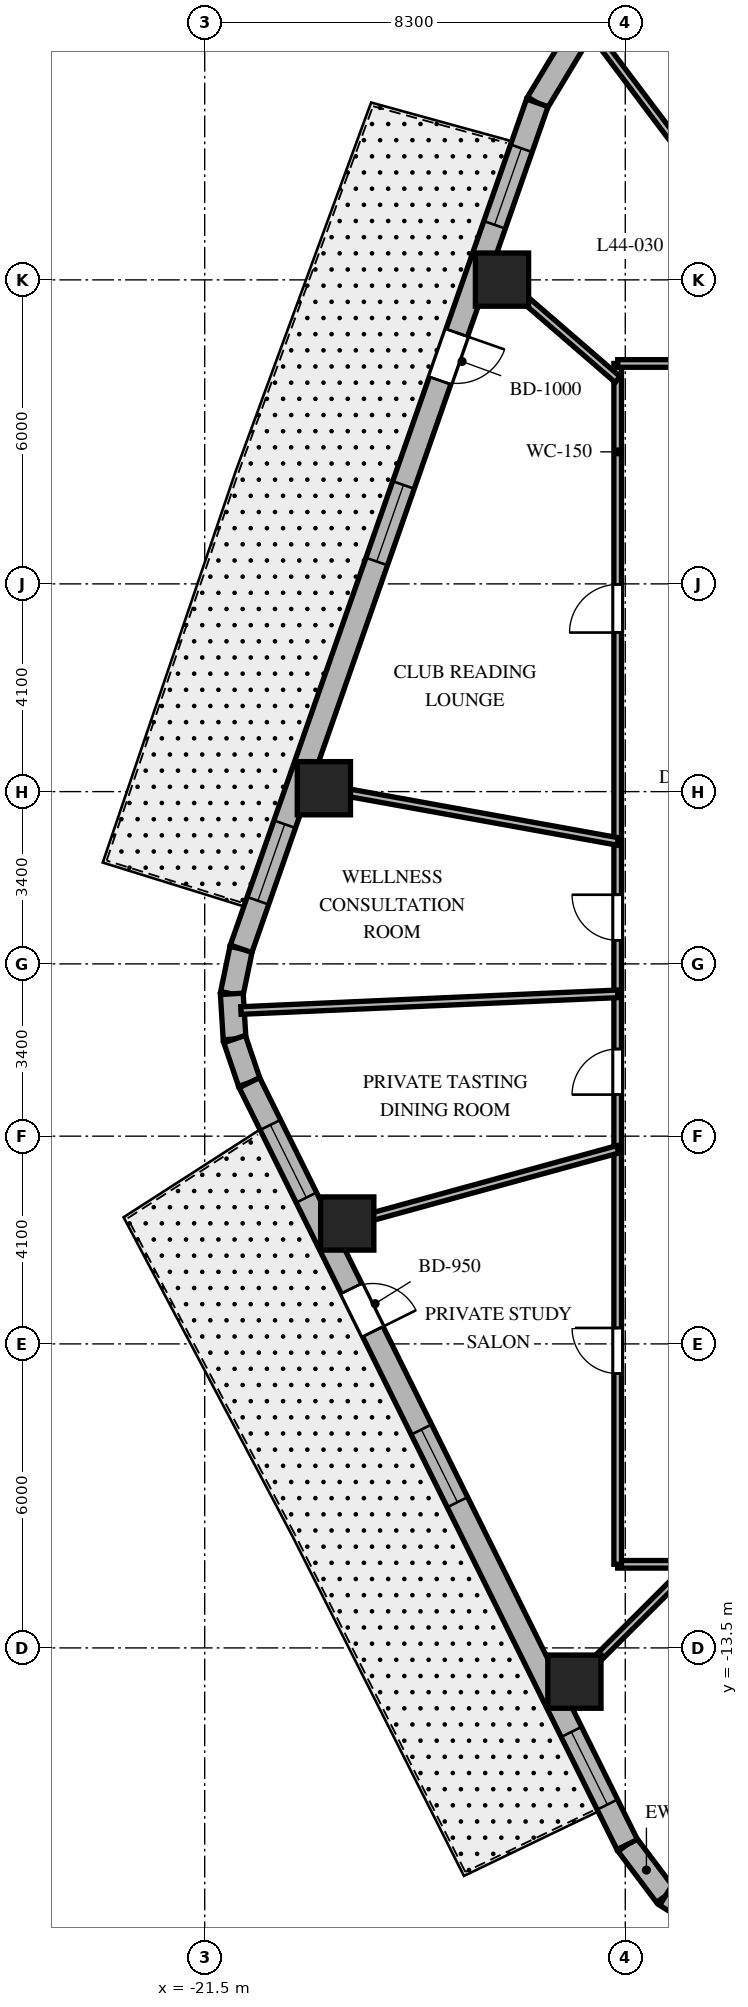
"""IFC4 building model, lengths in metres.
Left out: names, types, materials, properties, quantities, classifications, styles, units other than length and angle.
Written with IfcOpenShell. Run it as: python <this file> out.ifc"""

import sys

from ifc_helpers import new_model, si_unit, direction, frame, frame_2d, origin, origin_2d, place, context, subcontext, project, spatial, rectangle, extrude, element, fill, save


model = new_model("IFC4")
c1 = context("Model", 3, precision=1e-05, world=origin(), true_north=direction((0.0, 1.0)))
c2 = subcontext(c1, "Body", "Model", "MODEL_VIEW")
j1 = project(units=[si_unit("LENGTHUNIT", "METRE"), si_unit("PLANEANGLEUNIT", "RADIAN")], contexts=[c1])
p1 = place(None, origin())
s1 = spatial("IfcSite", under=j1, at=p1, CompositionType="ELEMENT")
p2 = place(p1, origin())
s2 = spatial("IfcBuilding", under=s1, at=p2, CompositionType="ELEMENT")
p3 = place(p2, frame((0.0, 0.0, 179.3)))
s3 = spatial("IfcBuildingStorey", under=s2, at=p3, CompositionType="ELEMENT", Elevation=179.3)
for number, where, z_axis, x_axis in (
    (1, (-15.633, 13.505, 0.0), (0.0, 0.0, 1.0), (1.0, 0.0, 0.0)),
    (2, (-19.148, 3.467, 0.0), (0.0, 0.0, 1.0), (1.0, 0.0, 0.0)),
    (3, (-18.687, -5.124, 0.0), (0.0, 0.0, 1.0), (1.0, 0.0, 0.0)),
    (4, (-14.204, -14.166, 0.0), (0.0, 0.0, 1.0), (1.0, 0.0, 0.0)),
):
    element("IfcColumn", number, at=place(p3, frame(where, z_axis=z_axis, x_axis=x_axis)), inside=s3, PredefinedType="COLUMN", context=c2, shape_type="SweptSolid", body=[
        extrude(rectangle(XDim=1.05, YDim=1.05, at=origin_2d()), origin(), (0.0, 0.0, 1.0), 3.7),
    ])
p4 = place(p3, frame((-13.162, -17.381, 0.0), z_axis=(0.0, 0.0, 1.0), x_axis=(0.601515770517, -0.798860925205, 0.0)))
e5 = element("IfcWall", 5, at=p4, inside=s3, PredefinedType="SOLIDWALL", context=c2, shape_type="SweptSolid", body=[
    extrude(rectangle(XDim=1.262, YDim=0.45, at=frame_2d((0.631, 0.0))), origin(), (0.0, 0.0, 1.0), 3.4),
])
p5 = place(p3, frame((-12.403, -18.389, 0.0), z_axis=(0.0, 0.0, 1.0), x_axis=(0.849795170926, -0.527113049991, 0.0)))
e6 = element("IfcWall", 6, at=p5, inside=s3, PredefinedType="SOLIDWALL", context=c2, shape_type="SweptSolid", body=[
    extrude(rectangle(XDim=1.241, YDim=0.45, at=frame_2d((0.62, 0.0))), origin(), (0.0, 0.0, 1.0), 3.4),
])
p6 = place(p3, frame((-14.214, 18.192, 0.0), z_axis=(0.0, 0.0, 1.0), x_axis=(-0.516340945502, -0.856383108193, 0.0)))
e7 = element("IfcWall", 7, at=p6, inside=s3, PredefinedType="SOLIDWALL", context=c2, shape_type="SweptSolid", body=[
    extrude(rectangle(XDim=1.4, YDim=0.45, at=frame_2d((0.7, 0.0))), origin(), (0.0, 0.0, 1.0), 3.4),
])
p7 = place(p3, frame((-20.782, 0.298, 0.0), z_axis=(0.0, 0.0, 1.0), x_axis=(-0.202570068411, -0.979267771033, 0.0)))
e8 = element("IfcWall", 8, at=p7, inside=s3, PredefinedType="SOLIDWALL", context=c2, shape_type="SweptSolid", body=[
    extrude(rectangle(XDim=0.909, YDim=0.45, at=frame_2d((0.454, 0.0))), origin(), (0.0, 0.0, 1.0), 3.4),
])
p8 = place(p3, frame((-20.966, -0.592, 0.0), z_axis=(0.0, 0.0, 1.0), x_axis=(0.061748898935, -0.998091715966, 0.0)))
e9 = element("IfcWall", 9, at=p8, inside=s3, PredefinedType="SOLIDWALL", context=c2, shape_type="SweptSolid", body=[
    extrude(rectangle(XDim=0.894, YDim=0.45, at=frame_2d((0.447, 0.0))), origin(), (0.0, 0.0, 1.0), 3.4),
])
p9 = place(p3, frame((-20.911, -1.484, 0.0), z_axis=(0.0, 0.0, 1.0), x_axis=(0.321623334353, -0.946867694453, 0.0)))
e10 = element("IfcWall", 10, at=p9, inside=s3, PredefinedType="SOLIDWALL", context=c2, shape_type="SweptSolid", body=[
    extrude(rectangle(XDim=0.909, YDim=0.45, at=frame_2d((0.454, 0.0))), origin(), (0.0, 0.0, 1.0), 3.4),
])
p10 = place(p3, frame((-14.937, 16.993, 0.0), z_axis=(0.0, 0.0, 1.0), x_axis=(-0.330431575061, -0.943829949834, 0.0)))
e11 = element("IfcWall", 11, at=p10, inside=s3, PredefinedType="SOLIDWALL", context=c2, shape_type="SweptSolid", body=[
    extrude(rectangle(XDim=17.689, YDim=0.45, at=frame_2d((8.844, 0.0))), origin(), (0.0, 0.0, 1.0), 3.4),
])
p11 = place(p10, frame((4.807, 0.0, 0.0)))
e12 = element("IfcOpeningElement", 12, at=p11, cuts=e11, PredefinedType="OPENING", context=c2, shape_type="SweptSolid", body=[
    extrude(rectangle(XDim=1.0, YDim=2.15, at=frame_2d((0.5, 1.075))), frame((0.0, 0.235, 0.0), z_axis=(0.0, -1.0, 0.0), x_axis=(1.0, 0.0, 0.0)), (0.0, 0.0, 1.0), 0.47),
])
p12 = place(p10, frame((0.95, 0.0, 0.8)))
e13 = element("IfcOpeningElement", 13, at=p12, cuts=e11, PredefinedType="OPENING", context=c2, shape_type="SweptSolid", body=[
    extrude(rectangle(XDim=1.6, YDim=1.75, at=frame_2d((0.8, 0.875))), frame((0.0, 0.235, 0.0), z_axis=(0.0, -1.0, 0.0), x_axis=(1.0, 0.0, 0.0)), (0.0, 0.0, 1.0), 0.47),
])
p13 = place(p10, frame((7.99, 0.0, 0.8)))
e14 = element("IfcOpeningElement", 14, at=p13, cuts=e11, PredefinedType="OPENING", context=c2, shape_type="SweptSolid", body=[
    extrude(rectangle(XDim=1.6, YDim=1.75, at=frame_2d((0.8, 0.875))), frame((0.0, 0.235, 0.0), z_axis=(0.0, -1.0, 0.0), x_axis=(1.0, 0.0, 0.0)), (0.0, 0.0, 1.0), 0.47),
])
p14 = place(p10, frame((15.084, 0.0, 0.8)))
e15 = element("IfcOpeningElement", 15, at=p14, cuts=e11, PredefinedType="OPENING", context=c2, shape_type="SweptSolid", body=[
    extrude(rectangle(XDim=1.6, YDim=1.75, at=frame_2d((0.8, 0.875))), frame((0.0, 0.235, 0.0), z_axis=(0.0, -1.0, 0.0), x_axis=(1.0, 0.0, 0.0)), (0.0, 0.0, 1.0), 0.47),
])
p15 = place(p3, frame((-20.618, -2.344, 0.0), z_axis=(0.0, 0.0, 1.0), x_axis=(0.444243691097, -0.895905990002, 0.0)))
e16 = element("IfcWall", 16, at=p15, inside=s3, PredefinedType="SOLIDWALL", context=c2, shape_type="SweptSolid", body=[
    extrude(rectangle(XDim=16.784, YDim=0.45, at=frame_2d((8.392, 0.0))), origin(), (0.0, 0.0, 1.0), 3.4),
])
p16 = place(p15, frame((4.535, 0.0, 0.0)))
e17 = element("IfcOpeningElement", 17, at=p16, cuts=e16, PredefinedType="OPENING", context=c2, shape_type="SweptSolid", body=[
    extrude(rectangle(XDim=0.95, YDim=2.15, at=frame_2d((0.475, 1.075))), frame((0.0, 0.235, 0.0), z_axis=(0.0, -1.0, 0.0), x_axis=(1.0, 0.0, 0.0)), (0.0, 0.0, 1.0), 0.47),
])
p17 = place(p15, frame((0.931, 0.0, 0.8)))
e18 = element("IfcOpeningElement", 18, at=p17, cuts=e16, PredefinedType="OPENING", context=c2, shape_type="SweptSolid", body=[
    extrude(rectangle(XDim=1.6, YDim=1.75, at=frame_2d((0.8, 0.875))), frame((0.0, 0.235, 0.0), z_axis=(0.0, -1.0, 0.0), x_axis=(1.0, 0.0, 0.0)), (0.0, 0.0, 1.0), 0.47),
])
p18 = place(p15, frame((7.642, 0.0, 0.8)))
e19 = element("IfcOpeningElement", 19, at=p18, cuts=e16, PredefinedType="OPENING", context=c2, shape_type="SweptSolid", body=[
    extrude(rectangle(XDim=1.6, YDim=1.75, at=frame_2d((0.8, 0.875))), frame((0.0, 0.235, 0.0), z_axis=(0.0, -1.0, 0.0), x_axis=(1.0, 0.0, 0.0)), (0.0, 0.0, 1.0), 0.47),
])
p19 = place(p15, frame((14.303, 0.0, 0.8)))
e20 = element("IfcOpeningElement", 20, at=p19, cuts=e16, PredefinedType="OPENING", context=c2, shape_type="SweptSolid", body=[
    extrude(rectangle(XDim=1.6, YDim=1.75, at=frame_2d((0.8, 0.875))), frame((0.0, 0.235, 0.0), z_axis=(0.0, -1.0, 0.0), x_axis=(1.0, 0.0, 0.0)), (0.0, 0.0, 1.0), 0.47),
])
p20 = place(p3, frame((13.35, -11.85, 0.0), z_axis=(0.0, 0.0, 1.0), x_axis=(-1.0, 0.0, 0.0)))
e21 = element("IfcWall", 21, at=p20, inside=s3, PredefinedType="PARTITIONING", context=c2, shape_type="SweptSolid", body=[
    extrude(rectangle(XDim=26.7, YDim=0.15, at=frame_2d((13.35, 0.0))), origin(), (0.0, 0.0, 1.0), 2.84),
])
p21 = place(p20, frame((22.7, 0.0, 0.0)))
e22 = element("IfcOpeningElement", 22, at=p21, cuts=e21, PredefinedType="OPENING", context=c2, shape_type="SweptSolid", body=[
    extrude(rectangle(XDim=0.9, YDim=2.03, at=frame_2d((0.45, 1.015))), frame((0.0, 0.085, 0.0), z_axis=(0.0, -1.0, 0.0), x_axis=(1.0, 0.0, 0.0)), (0.0, 0.0, 1.0), 0.17),
])
p22 = place(p20, frame((18.523, 0.0, 0.0)))
e23 = element("IfcOpeningElement", 23, at=p22, cuts=e21, PredefinedType="OPENING", context=c2, shape_type="SweptSolid", body=[
    extrude(rectangle(XDim=0.95, YDim=2.03, at=frame_2d((0.475, 1.015))), frame((0.0, 0.085, 0.0), z_axis=(0.0, -1.0, 0.0), x_axis=(1.0, 0.0, 0.0)), (0.0, 0.0, 1.0), 0.17),
])
p23 = place(p20, frame((14.469, 0.0, 0.0)))
e24 = element("IfcOpeningElement", 24, at=p23, cuts=e21, PredefinedType="OPENING", context=c2, shape_type="SweptSolid", body=[
    extrude(rectangle(XDim=0.95, YDim=2.03, at=frame_2d((0.475, 1.015))), frame((0.0, 0.085, 0.0), z_axis=(0.0, -1.0, 0.0), x_axis=(1.0, 0.0, 0.0)), (0.0, 0.0, 1.0), 0.17),
])
p24 = place(p20, frame((10.314, 0.0, 0.0)))
e25 = element("IfcOpeningElement", 25, at=p24, cuts=e21, PredefinedType="OPENING", context=c2, shape_type="SweptSolid", body=[
    extrude(rectangle(XDim=0.95, YDim=2.03, at=frame_2d((0.475, 1.015))), frame((0.0, 0.085, 0.0), z_axis=(0.0, -1.0, 0.0), x_axis=(1.0, 0.0, 0.0)), (0.0, 0.0, 1.0), 0.17),
])
p25 = place(p20, frame((3.995, 0.0, 0.0)))
e26 = element("IfcOpeningElement", 26, at=p25, cuts=e21, PredefinedType="OPENING", context=c2, shape_type="SweptSolid", body=[
    extrude(rectangle(XDim=0.95, YDim=2.03, at=frame_2d((0.475, 1.015))), frame((0.0, 0.085, 0.0), z_axis=(0.0, -1.0, 0.0), x_axis=(1.0, 0.0, 0.0)), (0.0, 0.0, 1.0), 0.17),
])
p26 = place(p3, frame((-13.35, -11.85, 0.0), z_axis=(0.0, 0.0, 1.0), x_axis=(0.0, 1.0, 0.0)))
e27 = element("IfcWall", 27, at=p26, inside=s3, PredefinedType="PARTITIONING", context=c2, shape_type="SweptSolid", body=[
    extrude(rectangle(XDim=23.7, YDim=0.15, at=frame_2d((11.85, 0.0))), origin(), (0.0, 0.0, 1.0), 2.84),
])
p27 = place(p26, frame((18.389, 0.0, 0.0)))
e28 = element("IfcOpeningElement", 28, at=p27, cuts=e27, PredefinedType="OPENING", context=c2, shape_type="SweptSolid", body=[
    extrude(rectangle(XDim=0.95, YDim=2.03, at=frame_2d((0.475, 1.015))), frame((0.0, 0.085, 0.0), z_axis=(0.0, -1.0, 0.0), x_axis=(1.0, 0.0, 0.0)), (0.0, 0.0, 1.0), 0.17),
])
p28 = place(p26, frame((12.315, 0.0, 0.0)))
e29 = element("IfcOpeningElement", 29, at=p28, cuts=e27, PredefinedType="OPENING", context=c2, shape_type="SweptSolid", body=[
    extrude(rectangle(XDim=0.9, YDim=2.03, at=frame_2d((0.45, 1.015))), frame((0.0, 0.085, 0.0), z_axis=(0.0, -1.0, 0.0), x_axis=(1.0, 0.0, 0.0)), (0.0, 0.0, 1.0), 0.17),
])
p29 = place(p26, frame((9.27, 0.0, 0.0)))
e30 = element("IfcOpeningElement", 30, at=p29, cuts=e27, PredefinedType="OPENING", context=c2, shape_type="SweptSolid", body=[
    extrude(rectangle(XDim=0.9, YDim=2.03, at=frame_2d((0.45, 1.015))), frame((0.0, 0.085, 0.0), z_axis=(0.0, -1.0, 0.0), x_axis=(1.0, 0.0, 0.0)), (0.0, 0.0, 1.0), 0.17),
])
p30 = place(p26, frame((3.765, 0.0, 0.0)))
e31 = element("IfcOpeningElement", 31, at=p30, cuts=e27, PredefinedType="OPENING", context=c2, shape_type="SweptSolid", body=[
    extrude(rectangle(XDim=0.9, YDim=2.03, at=frame_2d((0.45, 1.015))), frame((0.0, 0.085, 0.0), z_axis=(0.0, -1.0, 0.0), x_axis=(1.0, 0.0, 0.0)), (0.0, 0.0, 1.0), 0.17),
])
p31 = place(p3, frame((-13.35, 11.85, 0.0), z_axis=(0.0, 0.0, 1.0), x_axis=(1.0, 0.0, 0.0)))
e32 = element("IfcWall", 32, at=p31, inside=s3, PredefinedType="PARTITIONING", context=c2, shape_type="SweptSolid", body=[
    extrude(rectangle(XDim=26.7, YDim=0.15, at=frame_2d((13.35, 0.0))), origin(), (0.0, 0.0, 1.0), 2.84),
])
p32 = place(p31, frame((22.7, 0.0, 0.0)))
e33 = element("IfcOpeningElement", 33, at=p32, cuts=e32, PredefinedType="OPENING", context=c2, shape_type="SweptSolid", body=[
    extrude(rectangle(XDim=0.9, YDim=2.03, at=frame_2d((0.45, 1.015))), frame((0.0, 0.085, 0.0), z_axis=(0.0, -1.0, 0.0), x_axis=(1.0, 0.0, 0.0)), (0.0, 0.0, 1.0), 0.17),
])
p33 = place(p31, frame((18.523, 0.0, 0.0)))
e34 = element("IfcOpeningElement", 34, at=p33, cuts=e32, PredefinedType="OPENING", context=c2, shape_type="SweptSolid", body=[
    extrude(rectangle(XDim=0.95, YDim=2.03, at=frame_2d((0.475, 1.015))), frame((0.0, 0.085, 0.0), z_axis=(0.0, -1.0, 0.0), x_axis=(1.0, 0.0, 0.0)), (0.0, 0.0, 1.0), 0.17),
])
p34 = place(p31, frame((14.469, 0.0, 0.0)))
e35 = element("IfcOpeningElement", 35, at=p34, cuts=e32, PredefinedType="OPENING", context=c2, shape_type="SweptSolid", body=[
    extrude(rectangle(XDim=0.95, YDim=2.03, at=frame_2d((0.475, 1.015))), frame((0.0, 0.085, 0.0), z_axis=(0.0, -1.0, 0.0), x_axis=(1.0, 0.0, 0.0)), (0.0, 0.0, 1.0), 0.17),
])
p35 = place(p31, frame((10.314, 0.0, 0.0)))
e36 = element("IfcOpeningElement", 36, at=p35, cuts=e32, PredefinedType="OPENING", context=c2, shape_type="SweptSolid", body=[
    extrude(rectangle(XDim=0.95, YDim=2.03, at=frame_2d((0.475, 1.015))), frame((0.0, 0.085, 0.0), z_axis=(0.0, -1.0, 0.0), x_axis=(1.0, 0.0, 0.0)), (0.0, 0.0, 1.0), 0.17),
])
p36 = place(p31, frame((6.061, 0.0, 0.0)))
e37 = element("IfcOpeningElement", 37, at=p36, cuts=e32, PredefinedType="OPENING", context=c2, shape_type="SweptSolid", body=[
    extrude(rectangle(XDim=0.95, YDim=2.03, at=frame_2d((0.475, 1.015))), frame((0.0, 0.085, 0.0), z_axis=(0.0, -1.0, 0.0), x_axis=(1.0, 0.0, 0.0)), (0.0, 0.0, 1.0), 0.17),
])
p37 = place(p31, frame((1.886, 0.0, 0.0)))
e38 = element("IfcOpeningElement", 38, at=p37, cuts=e32, PredefinedType="OPENING", context=c2, shape_type="SweptSolid", body=[
    extrude(rectangle(XDim=0.9, YDim=2.03, at=frame_2d((0.45, 1.015))), frame((0.0, 0.085, 0.0), z_axis=(0.0, -1.0, 0.0), x_axis=(1.0, 0.0, 0.0)), (0.0, 0.0, 1.0), 0.17),
])
p38 = place(p3, frame((-8.918, 11.85, 0.0), z_axis=(0.0, 0.0, 1.0), x_axis=(-0.601347965064, 0.798987249531, 0.0)))
e39 = element("IfcWall", 39, at=p38, inside=s3, PredefinedType="PARTITIONING", context=c2, shape_type="SweptSolid", body=[
    extrude(rectangle(XDim=8.08, YDim=0.15, at=frame_2d((4.04, 0.0))), origin(), (0.0, 0.0, 1.0), 2.64),
])
p39 = place(p3, frame((-13.35, 11.533, 0.0), z_axis=(0.0, 0.0, 1.0), x_axis=(-0.756711647314, 0.65374879183, 0.0)))
e40 = element("IfcWall", 40, at=p39, inside=s3, PredefinedType="PARTITIONING", context=c2, shape_type="SweptSolid", body=[
    extrude(rectangle(XDim=3.55, YDim=0.15, at=frame_2d((1.775, 0.0))), origin(), (0.0, 0.0, 1.0), 2.64),
])
p40 = place(p3, frame((-13.35, 2.417, 0.0), z_axis=(0.0, 0.0, 1.0), x_axis=(-0.98399796473, 0.178179699761, 0.0)))
e41 = element("IfcWall", 41, at=p40, inside=s3, PredefinedType="PARTITIONING", context=c2, shape_type="SweptSolid", body=[
    extrude(rectangle(XDim=6.393, YDim=0.15, at=frame_2d((3.197, 0.0))), origin(), (0.0, 0.0, 1.0), 2.64),
])
p41 = place(p3, frame((-13.35, -0.591, 0.0), z_axis=(0.0, 0.0, 1.0), x_axis=(-0.999020359631, -0.044252921296, 0.0)))
e42 = element("IfcWall", 42, at=p41, inside=s3, PredefinedType="PARTITIONING", context=c2, shape_type="SweptSolid", body=[
    extrude(rectangle(XDim=7.442, YDim=0.15, at=frame_2d((3.721, 0.0))), origin(), (0.0, 0.0, 1.0), 2.64),
])
p42 = place(p3, frame((-13.35, -3.661, 0.0), z_axis=(0.0, 0.0, 1.0), x_axis=(-0.964397145454, -0.264458211898, 0.0)))
e43 = element("IfcWall", 43, at=p42, inside=s3, PredefinedType="PARTITIONING", context=c2, shape_type="SweptSolid", body=[
    extrude(rectangle(XDim=6.039, YDim=0.15, at=frame_2d((3.019, 0.0))), origin(), (0.0, 0.0, 1.0), 2.64),
])
p43 = place(p3, frame((-11.882, -11.85, 0.0), z_axis=(0.0, 0.0, 1.0), x_axis=(-0.708037373639, -0.706174962407, 0.0)))
e44 = element("IfcWall", 44, at=p43, inside=s3, PredefinedType="PARTITIONING", context=c2, shape_type="SweptSolid", body=[
    extrude(rectangle(XDim=3.802, YDim=0.15, at=frame_2d((1.901, 0.0))), origin(), (0.0, 0.0, 1.0), 2.64),
])
p44 = place(p11, origin())
e45 = element("IfcDoor", 45, at=p44, inside=s3, OperationType="SINGLE_SWING_LEFT", PredefinedType="DOOR", context=c2, shape_type="SweptSolid", body=[
    extrude(rectangle(XDim=1.0, YDim=2.15, at=frame_2d((0.5, 1.075))), frame((0.0, 0.025, 0.0), z_axis=(0.0, -1.0, 0.0), x_axis=(1.0, 0.0, 0.0)), (0.0, 0.0, 1.0), 0.05),
])
fill(e12, e45)
p45 = place(p12, origin())
e46 = element("IfcWindow", 46, at=p45, inside=s3, PartitioningType="SINGLE_PANEL", PredefinedType="WINDOW", context=c2, shape_type="SweptSolid", body=[
    extrude(rectangle(XDim=1.6, YDim=1.75, at=frame_2d((0.8, 0.875))), frame((0.0, 0.03, 0.0), z_axis=(0.0, -1.0, 0.0), x_axis=(1.0, 0.0, 0.0)), (0.0, 0.0, 1.0), 0.06),
])
fill(e13, e46)
p46 = place(p13, origin())
e47 = element("IfcWindow", 47, at=p46, inside=s3, PartitioningType="SINGLE_PANEL", PredefinedType="WINDOW", context=c2, shape_type="SweptSolid", body=[
    extrude(rectangle(XDim=1.6, YDim=1.75, at=frame_2d((0.8, 0.875))), frame((0.0, 0.03, 0.0), z_axis=(0.0, -1.0, 0.0), x_axis=(1.0, 0.0, 0.0)), (0.0, 0.0, 1.0), 0.06),
])
fill(e14, e47)
p47 = place(p14, origin())
e48 = element("IfcWindow", 48, at=p47, inside=s3, PartitioningType="SINGLE_PANEL", PredefinedType="WINDOW", context=c2, shape_type="SweptSolid", body=[
    extrude(rectangle(XDim=1.6, YDim=1.75, at=frame_2d((0.8, 0.875))), frame((0.0, 0.03, 0.0), z_axis=(0.0, -1.0, 0.0), x_axis=(1.0, 0.0, 0.0)), (0.0, 0.0, 1.0), 0.06),
])
fill(e15, e48)
p48 = place(p16, origin())
e49 = element("IfcDoor", 49, at=p48, inside=s3, OperationType="SINGLE_SWING_RIGHT", PredefinedType="DOOR", context=c2, shape_type="SweptSolid", body=[
    extrude(rectangle(XDim=0.95, YDim=2.15, at=frame_2d((0.475, 1.075))), frame((0.0, 0.025, 0.0), z_axis=(0.0, -1.0, 0.0), x_axis=(1.0, 0.0, 0.0)), (0.0, 0.0, 1.0), 0.05),
])
fill(e17, e49)
p49 = place(p17, origin())
e50 = element("IfcWindow", 50, at=p49, inside=s3, PartitioningType="SINGLE_PANEL", PredefinedType="WINDOW", context=c2, shape_type="SweptSolid", body=[
    extrude(rectangle(XDim=1.6, YDim=1.75, at=frame_2d((0.8, 0.875))), frame((0.0, 0.03, 0.0), z_axis=(0.0, -1.0, 0.0), x_axis=(1.0, 0.0, 0.0)), (0.0, 0.0, 1.0), 0.06),
])
fill(e18, e50)
p50 = place(p18, origin())
e51 = element("IfcWindow", 51, at=p50, inside=s3, PartitioningType="SINGLE_PANEL", PredefinedType="WINDOW", context=c2, shape_type="SweptSolid", body=[
    extrude(rectangle(XDim=1.6, YDim=1.75, at=frame_2d((0.8, 0.875))), frame((0.0, 0.03, 0.0), z_axis=(0.0, -1.0, 0.0), x_axis=(1.0, 0.0, 0.0)), (0.0, 0.0, 1.0), 0.06),
])
fill(e19, e51)
p51 = place(p19, origin())
e52 = element("IfcWindow", 52, at=p51, inside=s3, PartitioningType="SINGLE_PANEL", PredefinedType="WINDOW", context=c2, shape_type="SweptSolid", body=[
    extrude(rectangle(XDim=1.6, YDim=1.75, at=frame_2d((0.8, 0.875))), frame((0.0, 0.03, 0.0), z_axis=(0.0, -1.0, 0.0), x_axis=(1.0, 0.0, 0.0)), (0.0, 0.0, 1.0), 0.06),
])
fill(e20, e52)
p52 = place(p27, origin())
e53 = element("IfcDoor", 53, at=p52, inside=s3, OperationType="SINGLE_SWING_LEFT", PredefinedType="DOOR", context=c2, shape_type="SweptSolid", body=[
    extrude(rectangle(XDim=0.95, YDim=2.03, at=frame_2d((0.475, 1.015))), frame((0.0, 0.025, 0.0), z_axis=(0.0, -1.0, 0.0), x_axis=(1.0, 0.0, 0.0)), (0.0, 0.0, 1.0), 0.05),
])
fill(e28, e53)
p53 = place(p28, origin())
e54 = element("IfcDoor", 54, at=p53, inside=s3, OperationType="SINGLE_SWING_RIGHT", PredefinedType="DOOR", context=c2, shape_type="SweptSolid", body=[
    extrude(rectangle(XDim=0.9, YDim=2.03, at=frame_2d((0.45, 1.015))), frame((0.0, 0.025, 0.0), z_axis=(0.0, -1.0, 0.0), x_axis=(1.0, 0.0, 0.0)), (0.0, 0.0, 1.0), 0.05),
])
fill(e29, e54)
p54 = place(p29, origin())
e55 = element("IfcDoor", 55, at=p54, inside=s3, OperationType="SINGLE_SWING_LEFT", PredefinedType="DOOR", context=c2, shape_type="SweptSolid", body=[
    extrude(rectangle(XDim=0.9, YDim=2.03, at=frame_2d((0.45, 1.015))), frame((0.0, 0.025, 0.0), z_axis=(0.0, -1.0, 0.0), x_axis=(1.0, 0.0, 0.0)), (0.0, 0.0, 1.0), 0.05),
])
fill(e30, e55)
p55 = place(p30, origin())
e56 = element("IfcDoor", 56, at=p55, inside=s3, OperationType="SINGLE_SWING_RIGHT", PredefinedType="DOOR", context=c2, shape_type="SweptSolid", body=[
    extrude(rectangle(XDim=0.9, YDim=2.03, at=frame_2d((0.45, 1.015))), frame((0.0, 0.025, 0.0), z_axis=(0.0, -1.0, 0.0), x_axis=(1.0, 0.0, 0.0)), (0.0, 0.0, 1.0), 0.05),
])
fill(e31, e56)
save(model, sys.argv[1])
